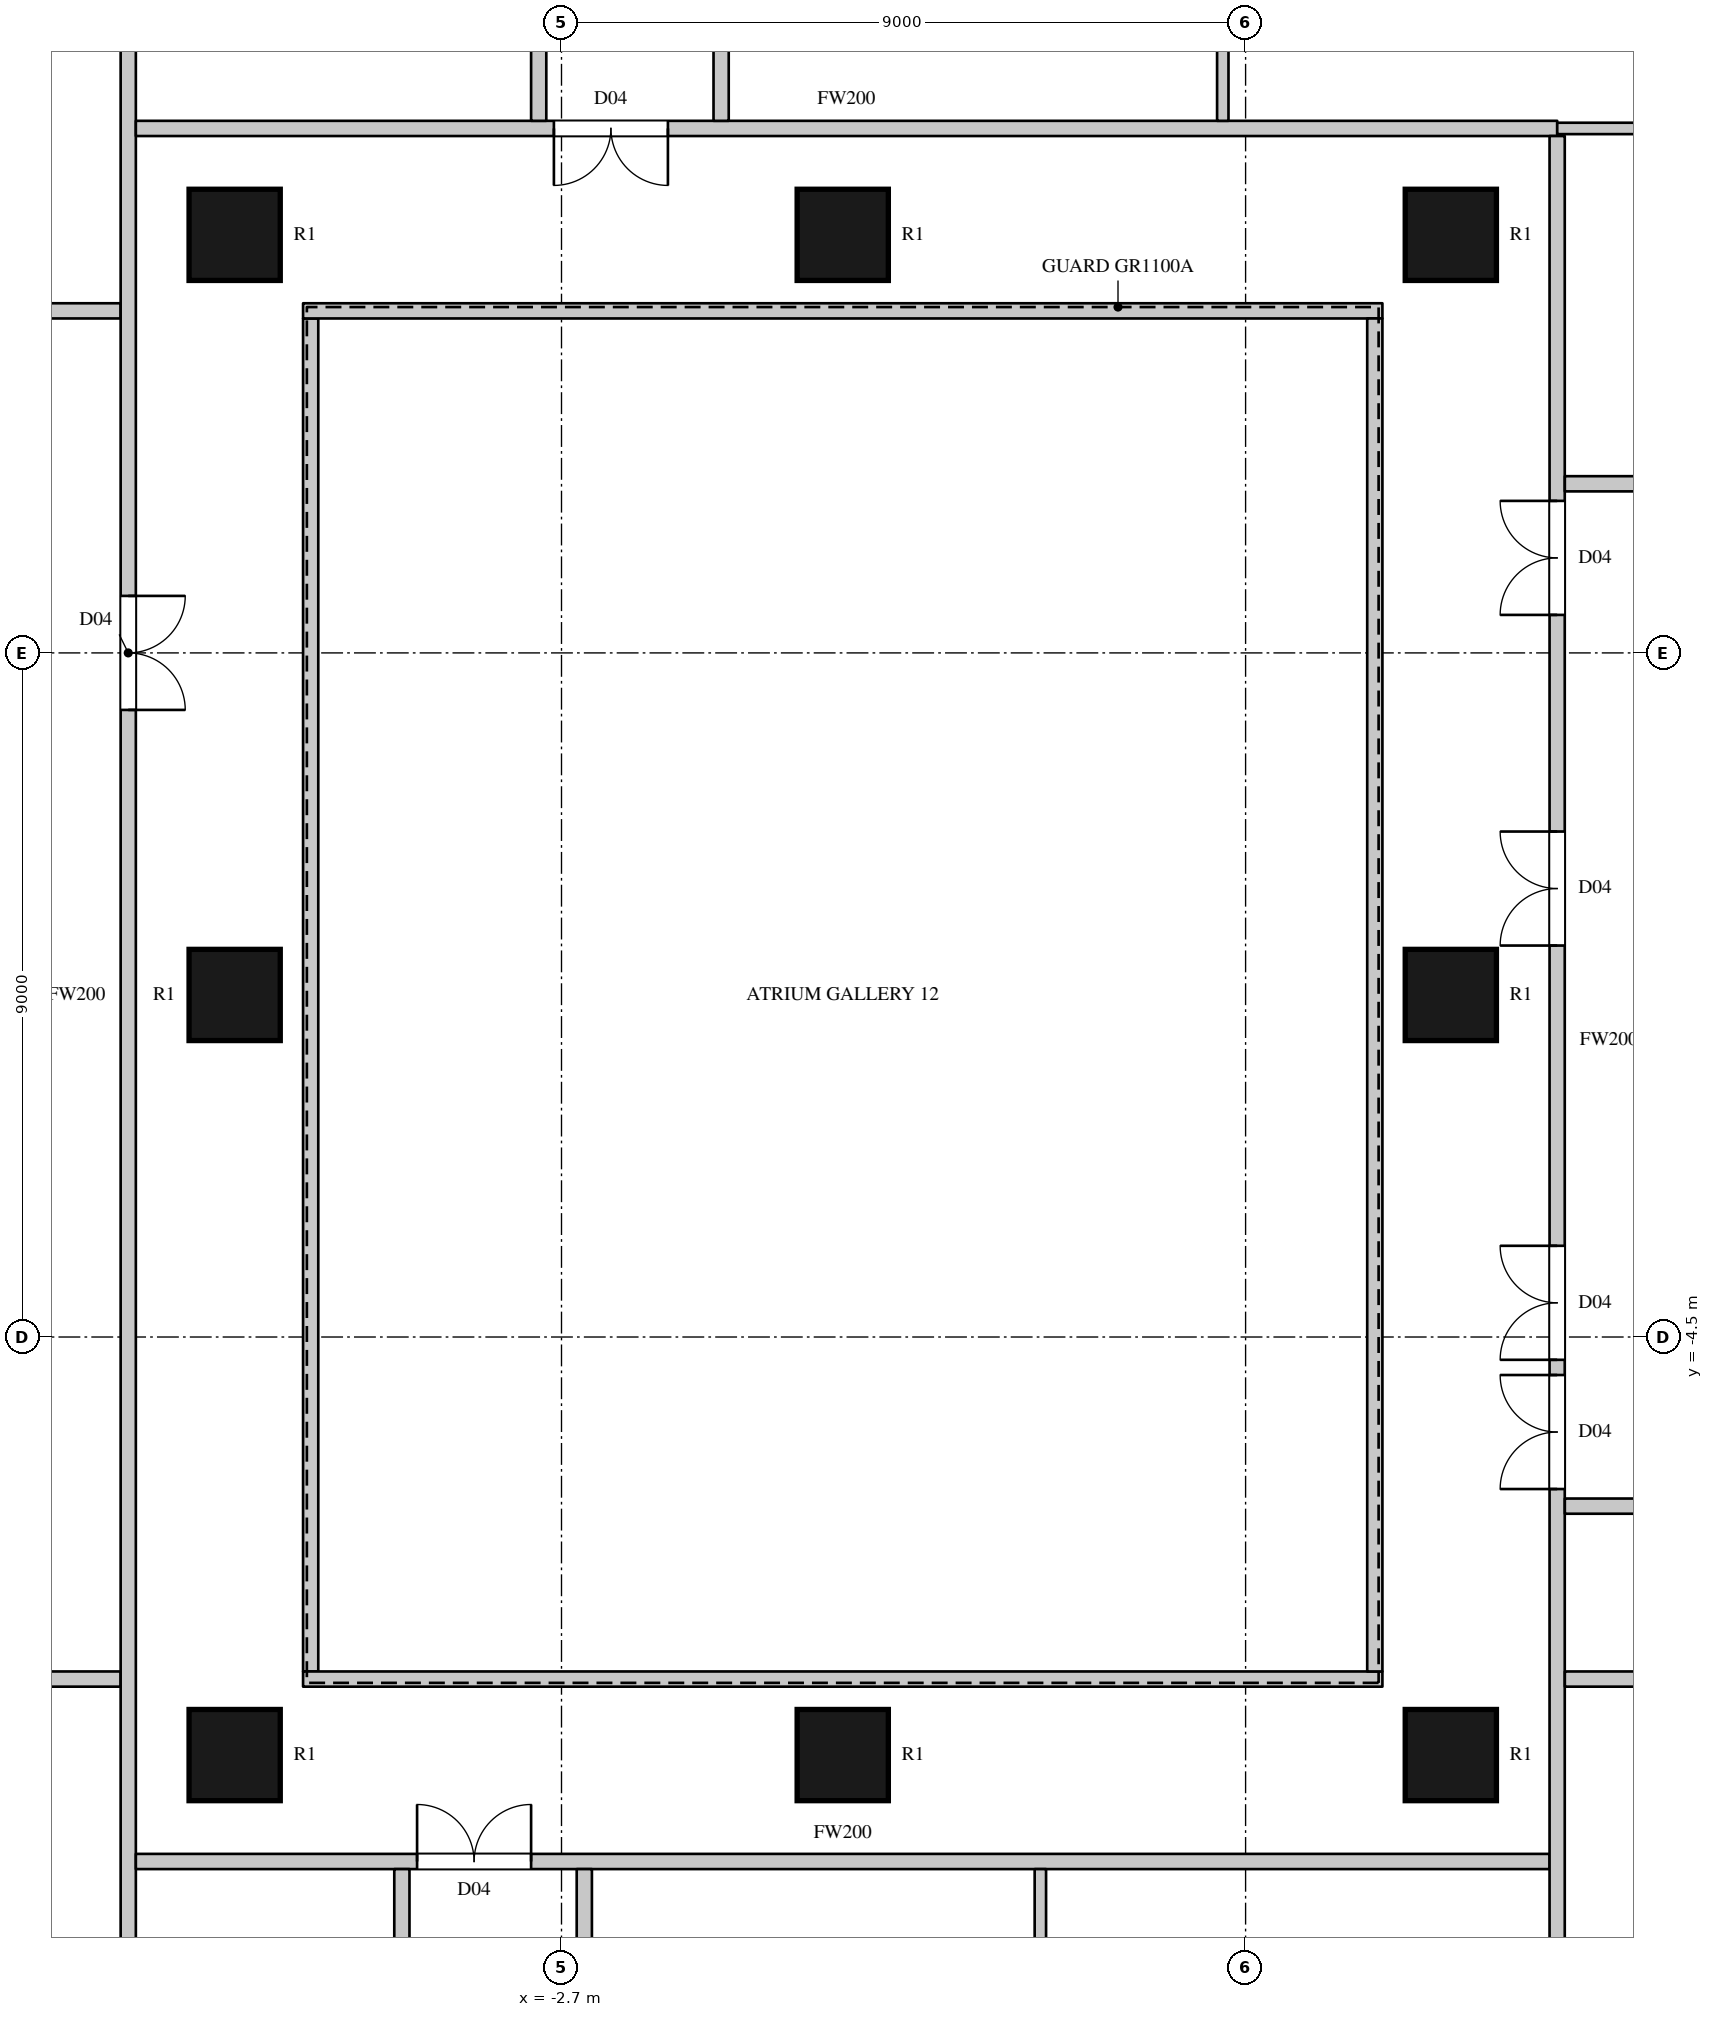
"""IFC4 building model, lengths in metres.
Left out: names, types, materials, properties, quantities, classifications, styles, units other than length and angle.
Written with IfcOpenShell. Run it as: python <this file> out.ifc"""

import sys

from ifc_helpers import new_model, si_unit, direction, frame, frame_2d, origin, origin_2d, place, context, subcontext, project, spatial, rectangle, circle, extrude, element, fill, save


model = new_model("IFC4")
c1 = context("Model", 3, precision=1e-05, world=origin(), true_north=direction((0.0, 1.0)))
c2 = subcontext(c1, "Body", "Model", "MODEL_VIEW")
j1 = project(units=[si_unit("LENGTHUNIT", "METRE"), si_unit("PLANEANGLEUNIT", "RADIAN")], contexts=[c1])
p1 = place(None, origin())
s1 = spatial("IfcSite", under=j1, at=p1, CompositionType="ELEMENT")
p2 = place(p1, origin())
s2 = spatial("IfcBuilding", under=s1, at=p2, CompositionType="ELEMENT")
p3 = place(p2, frame((0.0, 0.0, 73.5)))
s3 = spatial("IfcBuildingStorey", under=s2, at=p3, CompositionType="ELEMENT", Elevation=73.5)
for number, where, z_axis, x_axis in (
    (1, (-7.0, -10.0, 0.0), (0.0, 0.0, 1.0), (1.0, 0.0, 0.0)),
    (2, (-7.0, 0.0, 0.0), (0.0, 0.0, 1.0), (1.0, 0.0, 0.0)),
    (3, (-7.0, 10.0, 0.0), (0.0, 0.0, 1.0), (1.0, 0.0, 0.0)),
    (4, (1.0, -10.0, 0.0), (0.0, 0.0, 1.0), (1.0, 0.0, 0.0)),
    (5, (1.0, 10.0, 0.0), (0.0, 0.0, 1.0), (1.0, 0.0, 0.0)),
    (6, (9.0, -10.0, 0.0), (0.0, 0.0, 1.0), (1.0, 0.0, 0.0)),
    (7, (9.0, 0.0, 0.0), (0.0, 0.0, 1.0), (1.0, 0.0, 0.0)),
    (8, (9.0, 10.0, 0.0), (0.0, 0.0, 1.0), (1.0, 0.0, 0.0)),
):
    element("IfcColumn", number, at=place(p3, frame(where, z_axis=z_axis, x_axis=x_axis)), inside=s3, PredefinedType="COLUMN", context=c2, shape_type="SweptSolid", body=[
        extrude(circle(Radius=0.6, at=origin_2d()), origin(), (0.0, 0.0, 1.0), 3.6),
    ])
p4 = place(p3, frame((-13.97, -9.0, 0.0), z_axis=(0.0, 0.0, 1.0), x_axis=(1.0, 0.0, 0.0)))
e9 = element("IfcWall", 9, at=p4, inside=s3, PredefinedType="PARTITIONING", context=c2, shape_type="SweptSolid", body=[
    extrude(rectangle(XDim=5.47, YDim=0.2, at=frame_2d((2.735, 0.0))), origin(), (0.0, 0.0, 1.0), 3.3),
])
p5 = place(p4, frame((0.4, 0.0, 0.0)))
e10 = element("IfcOpeningElement", 10, at=p5, cuts=e9, PredefinedType="OPENING", context=c2, shape_type="SweptSolid", body=[
    extrude(rectangle(XDim=1.5, YDim=2.2, at=frame_2d((0.75, 1.1))), frame((0.0, 0.11, 0.0), z_axis=(0.0, -1.0, 0.0), x_axis=(1.0, 0.0, 0.0)), (0.0, 0.0, 1.0), 0.22),
])
p6 = place(p4, frame((2.05, 0.0, 0.0)))
e11 = element("IfcOpeningElement", 11, at=p6, cuts=e9, PredefinedType="OPENING", context=c2, shape_type="SweptSolid", body=[
    extrude(rectangle(XDim=1.5, YDim=2.2, at=frame_2d((0.75, 1.1))), frame((0.0, 0.11, 0.0), z_axis=(0.0, -1.0, 0.0), x_axis=(1.0, 0.0, 0.0)), (0.0, 0.0, 1.0), 0.22),
])
p7 = place(p3, frame((-13.97, 9.0, 0.0), z_axis=(0.0, 0.0, 1.0), x_axis=(1.0, 0.0, 0.0)))
e12 = element("IfcWall", 12, at=p7, inside=s3, PredefinedType="PARTITIONING", context=c2, shape_type="SweptSolid", body=[
    extrude(rectangle(XDim=5.47, YDim=0.2, at=frame_2d((2.735, 0.0))), origin(), (0.0, 0.0, 1.0), 3.3),
])
p8 = place(p3, frame((-8.4, -17.4, 0.0), z_axis=(0.0, 0.0, 1.0), x_axis=(0.0, 1.0, 0.0)))
e13 = element("IfcWall", 13, at=p8, inside=s3, PredefinedType="PARTITIONING", context=c2, shape_type="SweptSolid", body=[
    extrude(rectangle(XDim=34.8, YDim=0.2, at=frame_2d((17.4, 0.0))), origin(), (0.0, 0.0, 1.0), 3.3),
])
p9 = place(p8, frame((21.15, 0.0, 0.0)))
e14 = element("IfcOpeningElement", 14, at=p9, cuts=e13, PredefinedType="OPENING", context=c2, shape_type="SweptSolid", body=[
    extrude(rectangle(XDim=1.5, YDim=2.2, at=frame_2d((0.75, 1.1))), frame((0.0, 0.11, 0.0), z_axis=(0.0, -1.0, 0.0), x_axis=(1.0, 0.0, 0.0)), (0.0, 0.0, 1.0), 0.22),
])
p10 = place(p8, frame((33.75, 0.0, 0.0)))
e15 = element("IfcOpeningElement", 15, at=p10, cuts=e13, PredefinedType="OPENING", context=c2, shape_type="SweptSolid", body=[
    extrude(rectangle(XDim=0.9, YDim=2.2, at=frame_2d((0.45, 1.1))), frame((0.0, 0.11, 0.0), z_axis=(0.0, -1.0, 0.0), x_axis=(1.0, 0.0, 0.0)), (0.0, 0.0, 1.0), 0.22),
])
p11 = place(p8, frame((0.15, 0.0, 0.0)))
e16 = element("IfcOpeningElement", 16, at=p11, cuts=e13, PredefinedType="OPENING", context=c2, shape_type="SweptSolid", body=[
    extrude(rectangle(XDim=0.95, YDim=2.2, at=frame_2d((0.475, 1.1))), frame((0.0, 0.11, 0.0), z_axis=(0.0, -1.0, 0.0), x_axis=(1.0, 0.0, 0.0)), (0.0, 0.0, 1.0), 0.22),
])
p12 = place(p3, frame((-8.3, -11.4, 0.0), z_axis=(0.0, 0.0, 1.0), x_axis=(1.0, 0.0, 0.0)))
e17 = element("IfcWall", 17, at=p12, inside=s3, PredefinedType="PARTITIONING", context=c2, shape_type="SweptSolid", body=[
    extrude(rectangle(XDim=18.6, YDim=0.2, at=frame_2d((9.3, 0.0))), origin(), (0.0, 0.0, 1.0), 3.3),
])
p13 = place(p12, frame((3.7, 0.0, 0.0)))
e18 = element("IfcOpeningElement", 18, at=p13, cuts=e17, PredefinedType="OPENING", context=c2, shape_type="SweptSolid", body=[
    extrude(rectangle(XDim=1.5, YDim=2.2, at=frame_2d((0.75, 1.1))), frame((0.0, 0.11, 0.0), z_axis=(0.0, -1.0, 0.0), x_axis=(1.0, 0.0, 0.0)), (0.0, 0.0, 1.0), 0.22),
])
p14 = place(p3, frame((-8.3, 11.4, 0.0), z_axis=(0.0, 0.0, 1.0), x_axis=(1.0, 0.0, 0.0)))
e19 = element("IfcWall", 19, at=p14, inside=s3, PredefinedType="PARTITIONING", context=c2, shape_type="SweptSolid", body=[
    extrude(rectangle(XDim=18.7, YDim=0.2, at=frame_2d((9.35, 0.0))), origin(), (0.0, 0.0, 1.0), 3.3),
])
p15 = place(p14, frame((5.5, 0.0, 0.0)))
e20 = element("IfcOpeningElement", 20, at=p15, cuts=e19, PredefinedType="OPENING", context=c2, shape_type="SweptSolid", body=[
    extrude(rectangle(XDim=1.5, YDim=2.2, at=frame_2d((0.75, 1.1))), frame((0.0, 0.11, 0.0), z_axis=(0.0, -1.0, 0.0), x_axis=(1.0, 0.0, 0.0)), (0.0, 0.0, 1.0), 0.22),
])
p16 = place(p3, frame((-6.0, -8.9, 0.0), z_axis=(0.0, 0.0, 1.0), x_axis=(0.0, 1.0, 0.0)))
e21 = element("IfcWall", 21, at=p16, inside=s3, PredefinedType="PARTITIONING", context=c2, shape_type="SweptSolid", body=[
    extrude(rectangle(XDim=17.8, YDim=0.2, at=frame_2d((8.9, 0.0))), origin(), (0.0, 0.0, 1.0), 3.3),
])
for number, where, z_axis, x_axis in (
    (22, (-6.1, -9.0, 0.0), (0.0, 0.0, 1.0), (1.0, 0.0, 0.0)),
    (23, (-6.1, 9.0, 0.0), (0.0, 0.0, 1.0), (1.0, 0.0, 0.0)),
):
    element("IfcWall", number, at=place(p3, frame(where, z_axis=z_axis, x_axis=x_axis)), inside=s3, PredefinedType="PARTITIONING", context=c2, shape_type="SweptSolid", body=[
        extrude(rectangle(XDim=14.2, YDim=0.2, at=frame_2d((7.1, 0.0))), origin(), (0.0, 0.0, 1.0), 3.3),
    ])
p17 = place(p3, frame((-4.8, -17.4, 0.0), z_axis=(0.0, 0.0, 1.0), x_axis=(0.0, 1.0, 0.0)))
e24 = element("IfcWall", 24, at=p17, inside=s3, PredefinedType="PARTITIONING", context=c2, shape_type="SweptSolid", body=[
    extrude(rectangle(XDim=5.9, YDim=0.2, at=frame_2d((2.95, 0.0))), origin(), (0.0, 0.0, 1.0), 3.3),
])
p18 = place(p3, frame((-3.0, 11.5, 0.0), z_axis=(0.0, 0.0, 1.0), x_axis=(0.0, 1.0, 0.0)))
e25 = element("IfcWall", 25, at=p18, inside=s3, PredefinedType="PARTITIONING", context=c2, shape_type="SweptSolid", body=[
    extrude(rectangle(XDim=5.443, YDim=0.2, at=frame_2d((2.722, 0.0))), origin(), (0.0, 0.0, 1.0), 3.3),
])
p19 = place(p3, frame((-2.4, -16.943, 0.0), z_axis=(0.0, 0.0, 1.0), x_axis=(0.0, 1.0, 0.0)))
e26 = element("IfcWall", 26, at=p19, inside=s3, PredefinedType="PARTITIONING", context=c2, shape_type="SweptSolid", body=[
    extrude(rectangle(XDim=5.443, YDim=0.2, at=frame_2d((2.722, 0.0))), origin(), (0.0, 0.0, 1.0), 3.3),
])
p20 = place(p19, frame((0.3, 0.0, 0.0)))
e27 = element("IfcOpeningElement", 27, at=p20, cuts=e26, PredefinedType="OPENING", context=c2, shape_type="SweptSolid", body=[
    extrude(rectangle(XDim=0.95, YDim=2.2, at=frame_2d((0.475, 1.1))), frame((0.0, 0.11, 0.0), z_axis=(0.0, -1.0, 0.0), x_axis=(1.0, 0.0, 0.0)), (0.0, 0.0, 1.0), 0.22),
])
p21 = place(p3, frame((-0.6, 11.5, 0.0), z_axis=(0.0, 0.0, 1.0), x_axis=(0.0, 1.0, 0.0)))
e28 = element("IfcWall", 28, at=p21, inside=s3, PredefinedType="PARTITIONING", context=c2, shape_type="SweptSolid", body=[
    extrude(rectangle(XDim=5.9, YDim=0.2, at=frame_2d((2.95, 0.0))), origin(), (0.0, 0.0, 1.0), 3.3),
])
p22 = place(p21, frame((4.15, 0.0, 0.0)))
e29 = element("IfcOpeningElement", 29, at=p22, cuts=e28, PredefinedType="OPENING", context=c2, shape_type="SweptSolid", body=[
    extrude(rectangle(XDim=1.6, YDim=2.4, at=frame_2d((0.8, 1.2))), frame((0.0, 0.11, 0.0), z_axis=(0.0, -1.0, 0.0), x_axis=(1.0, 0.0, 0.0)), (0.0, 0.0, 1.0), 0.22),
])
p23 = place(p3, frame((8.0, -8.9, 0.0), z_axis=(0.0, 0.0, 1.0), x_axis=(0.0, 1.0, 0.0)))
e30 = element("IfcWall", 30, at=p23, inside=s3, PredefinedType="PARTITIONING", context=c2, shape_type="SweptSolid", body=[
    extrude(rectangle(XDim=17.8, YDim=0.2, at=frame_2d((8.9, 0.0))), origin(), (0.0, 0.0, 1.0), 3.3),
])
p24 = place(p3, frame((10.399, -12.5, 0.0), z_axis=(0.0, 0.0, 1.0), x_axis=(0.0, 1.0, 0.0)))
e31 = element("IfcWall", 31, at=p24, inside=s3, PredefinedType="PARTITIONING", context=c2, shape_type="SweptSolid", body=[
    extrude(rectangle(XDim=23.8, YDim=0.2, at=frame_2d((11.9, 0.0))), origin(), (0.0, 0.0, 1.0), 3.3),
])
p25 = place(p24, frame((6.0, 0.0, 0.0)))
e32 = element("IfcOpeningElement", 32, at=p25, cuts=e31, PredefinedType="OPENING", context=c2, shape_type="SweptSolid", body=[
    extrude(rectangle(XDim=1.5, YDim=2.2, at=frame_2d((0.75, 1.1))), frame((0.0, 0.11, 0.0), z_axis=(0.0, -1.0, 0.0), x_axis=(1.0, 0.0, 0.0)), (0.0, 0.0, 1.0), 0.22),
])
p26 = place(p24, frame((17.5, 0.0, 0.0)))
e33 = element("IfcOpeningElement", 33, at=p26, cuts=e31, PredefinedType="OPENING", context=c2, shape_type="SweptSolid", body=[
    extrude(rectangle(XDim=1.5, YDim=2.2, at=frame_2d((0.75, 1.1))), frame((0.0, 0.11, 0.0), z_axis=(0.0, -1.0, 0.0), x_axis=(1.0, 0.0, 0.0)), (0.0, 0.0, 1.0), 0.22),
])
p27 = place(p24, frame((7.7, 0.0, 0.0)))
e34 = element("IfcOpeningElement", 34, at=p27, cuts=e31, PredefinedType="OPENING", context=c2, shape_type="SweptSolid", body=[
    extrude(rectangle(XDim=1.5, YDim=2.2, at=frame_2d((0.75, 1.1))), frame((0.0, 0.11, 0.0), z_axis=(0.0, -1.0, 0.0), x_axis=(1.0, 0.0, 0.0)), (0.0, 0.0, 1.0), 0.22),
])
p28 = place(p24, frame((13.15, 0.0, 0.0)))
e35 = element("IfcOpeningElement", 35, at=p28, cuts=e31, PredefinedType="OPENING", context=c2, shape_type="SweptSolid", body=[
    extrude(rectangle(XDim=1.5, YDim=2.2, at=frame_2d((0.75, 1.1))), frame((0.0, 0.11, 0.0), z_axis=(0.0, -1.0, 0.0), x_axis=(1.0, 0.0, 0.0)), (0.0, 0.0, 1.0), 0.22),
])
p29 = place(p3, frame((10.5, -9.0, 0.0), z_axis=(0.0, 0.0, 1.0), x_axis=(1.0, 0.0, 0.0)))
e36 = element("IfcWall", 36, at=p29, inside=s3, PredefinedType="PARTITIONING", context=c2, shape_type="SweptSolid", body=[
    extrude(rectangle(XDim=5.7, YDim=0.2, at=frame_2d((2.85, 0.0))), origin(), (0.0, 0.0, 1.0), 2.65),
])
p30 = place(p29, frame((4.45, 0.0, 0.0)))
e37 = element("IfcOpeningElement", 37, at=p30, cuts=e36, PredefinedType="OPENING", context=c2, shape_type="SweptSolid", body=[
    extrude(rectangle(XDim=0.95, YDim=2.2, at=frame_2d((0.475, 1.1))), frame((0.0, 0.11, 0.0), z_axis=(0.0, -1.0, 0.0), x_axis=(1.0, 0.0, 0.0)), (0.0, 0.0, 1.0), 0.22),
])
p31 = place(p3, frame((10.5, -6.725, 0.0), z_axis=(0.0, 0.0, 1.0), x_axis=(1.0, 0.0, 0.0)))
e38 = element("IfcWall", 38, at=p31, inside=s3, PredefinedType="PARTITIONING", context=c2, shape_type="SweptSolid", body=[
    extrude(rectangle(XDim=5.7, YDim=0.2, at=frame_2d((2.85, 0.0))), origin(), (0.0, 0.0, 1.0), 3.3),
])
p32 = place(p3, frame((10.5, 6.725, 0.0), z_axis=(0.0, 0.0, 1.0), x_axis=(1.0, 0.0, 0.0)))
e39 = element("IfcWall", 39, at=p32, inside=s3, PredefinedType="PARTITIONING", context=c2, shape_type="SweptSolid", body=[
    extrude(rectangle(XDim=5.7, YDim=0.2, at=frame_2d((2.85, 0.0))), origin(), (0.0, 0.0, 1.0), 3.3),
])
p33 = place(p32, frame((4.5, 0.0, 0.0)))
e40 = element("IfcOpeningElement", 40, at=p33, cuts=e39, PredefinedType="OPENING", context=c2, shape_type="SweptSolid", body=[
    extrude(rectangle(XDim=0.9, YDim=2.2, at=frame_2d((0.45, 1.1))), frame((0.0, 0.11, 0.0), z_axis=(0.0, -1.0, 0.0), x_axis=(1.0, 0.0, 0.0)), (0.0, 0.0, 1.0), 0.22),
])
p34 = place(p3, frame((3.6, -17.4, 0.0), z_axis=(0.0, 0.0, 1.0), x_axis=(0.0, 1.0, 0.0)))
e41 = element("IfcWall", 41, at=p34, inside=s3, PredefinedType="PARTITIONING", context=c2, shape_type="SweptSolid", body=[
    extrude(rectangle(XDim=5.9, YDim=0.15, at=frame_2d((2.95, 0.0))), origin(), (0.0, 0.0, 1.0), 3.3),
])
p35 = place(p3, frame((6.0, 11.5, 0.0), z_axis=(0.0, 0.0, 1.0), x_axis=(0.0, 1.0, 0.0)))
e42 = element("IfcWall", 42, at=p35, inside=s3, PredefinedType="PARTITIONING", context=c2, shape_type="SweptSolid", body=[
    extrude(rectangle(XDim=5.453, YDim=0.15, at=frame_2d((2.727, 0.0))), origin(), (0.0, 0.0, 1.0), 3.3),
])
p36 = place(p3, frame((10.4, 11.4, 0.0), z_axis=(0.0, 0.0, 1.0), x_axis=(1.0, 0.0, 0.0)))
e43 = element("IfcWall", 43, at=p36, inside=s3, PredefinedType="PARTITIONING", context=c2, shape_type="SweptSolid", body=[
    extrude(rectangle(XDim=5.6, YDim=0.15, at=frame_2d((2.8, 0.0))), origin(), (0.0, 0.0, 1.0), 3.3),
])
p37 = place(p9, origin())
e44 = element("IfcDoor", 44, at=p37, inside=s3, OperationType="DOUBLE_DOOR_SINGLE_SWING", PredefinedType="DOOR", context=c2, shape_type="SweptSolid", body=[
    extrude(rectangle(XDim=1.5, YDim=2.2, at=frame_2d((0.75, 1.1))), frame((0.0, 0.025, 0.0), z_axis=(0.0, -1.0, 0.0), x_axis=(1.0, 0.0, 0.0)), (0.0, 0.0, 1.0), 0.05),
])
fill(e14, e44)
p38 = place(p13, origin())
e45 = element("IfcDoor", 45, at=p38, inside=s3, OperationType="DOUBLE_DOOR_SINGLE_SWING", PredefinedType="DOOR", context=c2, shape_type="SweptSolid", body=[
    extrude(rectangle(XDim=1.5, YDim=2.2, at=frame_2d((0.75, 1.1))), frame((0.0, 0.025, 0.0), z_axis=(0.0, -1.0, 0.0), x_axis=(1.0, 0.0, 0.0)), (0.0, 0.0, 1.0), 0.05),
])
fill(e18, e45)
p39 = place(p15, origin())
e46 = element("IfcDoor", 46, at=p39, inside=s3, OperationType="DOUBLE_DOOR_SINGLE_SWING", PredefinedType="DOOR", context=c2, shape_type="SweptSolid", body=[
    extrude(rectangle(XDim=1.5, YDim=2.2, at=frame_2d((0.75, 1.1))), frame((0.0, 0.025, 0.0), z_axis=(0.0, -1.0, 0.0), x_axis=(1.0, 0.0, 0.0)), (0.0, 0.0, 1.0), 0.05),
])
fill(e20, e46)
p40 = place(p25, origin())
e47 = element("IfcDoor", 47, at=p40, inside=s3, OperationType="DOUBLE_DOOR_SINGLE_SWING", PredefinedType="DOOR", context=c2, shape_type="SweptSolid", body=[
    extrude(rectangle(XDim=1.5, YDim=2.2, at=frame_2d((0.75, 1.1))), frame((0.0, 0.025, 0.0), z_axis=(0.0, -1.0, 0.0), x_axis=(1.0, 0.0, 0.0)), (0.0, 0.0, 1.0), 0.05),
])
fill(e32, e47)
p41 = place(p26, origin())
e48 = element("IfcDoor", 48, at=p41, inside=s3, OperationType="DOUBLE_DOOR_SINGLE_SWING", PredefinedType="DOOR", context=c2, shape_type="SweptSolid", body=[
    extrude(rectangle(XDim=1.5, YDim=2.2, at=frame_2d((0.75, 1.1))), frame((0.0, 0.025, 0.0), z_axis=(0.0, -1.0, 0.0), x_axis=(1.0, 0.0, 0.0)), (0.0, 0.0, 1.0), 0.05),
])
fill(e33, e48)
p42 = place(p27, origin())
e49 = element("IfcDoor", 49, at=p42, inside=s3, OperationType="DOUBLE_DOOR_SINGLE_SWING", PredefinedType="DOOR", context=c2, shape_type="SweptSolid", body=[
    extrude(rectangle(XDim=1.5, YDim=2.2, at=frame_2d((0.75, 1.1))), frame((0.0, 0.025, 0.0), z_axis=(0.0, -1.0, 0.0), x_axis=(1.0, 0.0, 0.0)), (0.0, 0.0, 1.0), 0.05),
])
fill(e34, e49)
p43 = place(p28, origin())
e50 = element("IfcDoor", 50, at=p43, inside=s3, OperationType="DOUBLE_DOOR_SINGLE_SWING", PredefinedType="DOOR", context=c2, shape_type="SweptSolid", body=[
    extrude(rectangle(XDim=1.5, YDim=2.2, at=frame_2d((0.75, 1.1))), frame((0.0, 0.025, 0.0), z_axis=(0.0, -1.0, 0.0), x_axis=(1.0, 0.0, 0.0)), (0.0, 0.0, 1.0), 0.05),
])
fill(e35, e50)
save(model, sys.argv[1])
